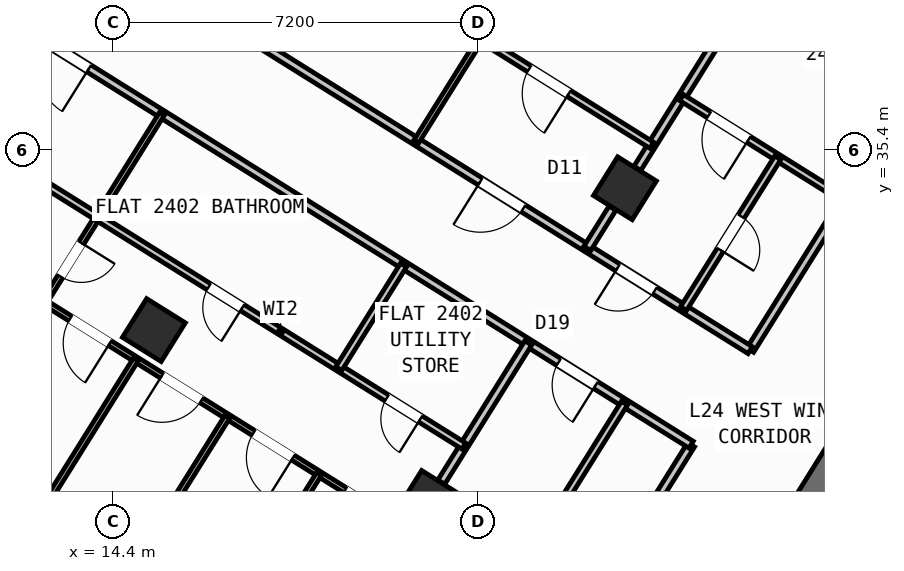
"""IFC4 building model, lengths in metres.
Left out: names, types, materials, properties, quantities, classifications, styles, units other than length and angle.
Written with IfcOpenShell. Run it as: python <this file> out.ifc"""

import sys

from ifc_helpers import new_model, si_unit, direction, frame, frame_2d, origin, origin_2d, place, context, subcontext, project, spatial, rectangle, hollow_rectangle, extrude, source, transform, mapped, element, fill, save


model = new_model("IFC4")
c1 = context("Model", 3, precision=1e-05, world=origin(), true_north=direction((0.0, 1.0)))
c2 = subcontext(c1, "Body", "Model", "MODEL_VIEW")
j1 = project(units=[si_unit("LENGTHUNIT", "METRE"), si_unit("PLANEANGLEUNIT", "RADIAN")], contexts=[c1])
p1 = place(None, origin())
s1 = spatial("IfcSite", under=j1, at=p1, CompositionType="ELEMENT")
p2 = place(p1, origin())
s2 = spatial("IfcBuilding", under=s1, at=p2, CompositionType="ELEMENT")
p3 = place(p2, frame((0.0, 0.0, 97.2)))
s3 = spatial("IfcBuildingStorey", under=s2, at=p3, CompositionType="ELEMENT", Elevation=97.2)
p4 = place(p3, frame((29.491, 30.552, 0.0), z_axis=(0.0, 0.0, 1.0), x_axis=(-0.529893103397, -0.8480644427, 0.0)))
e1 = element("IfcWall", 1, at=p4, inside=s3, PredefinedType="SHEAR", context=c2, shape_type="SweptSolid", body=[
    extrude(rectangle(XDim=3.525, YDim=0.65, at=frame_2d((1.763, 0.0))), origin(), (0.0, 0.0, 1.0), 3.32),
])
m1 = source(origin(), c2, "Body", "SweptSolid", [
    extrude(hollow_rectangle(XDim=0.9, YDim=0.9, WallThickness=0.036, at=origin_2d()), origin(), (0.0, 0.0, 1.0), 3.6),
])
for number, where, z_axis, x_axis in (
    (2, (24.5, 34.643, 0.0), (0.0, 0.0, 1.0), (-0.848, 0.53, 0.0)),
    (3, (20.632, 28.452, 0.0), (0.0, 0.0, 1.0), (-0.848, 0.53, 0.0)),
    (4, (15.205, 31.844, 0.0), (0.0, 0.0, 1.0), (-0.848, 0.53, 0.0)),
):
    element("IfcColumn", number, at=place(p3, frame(where, z_axis=z_axis, x_axis=x_axis)), inside=s3, PredefinedType="COLUMN", context=c2, shape_type="MappedRepresentation", body=[
        mapped(m1, transform((0.0, 0.0, 0.0), scale=1.0)),
    ])
p5 = place(p3, frame((5.7, 28.71, 0.0), z_axis=(0.0, 0.0, 1.0), x_axis=(0.529923711467, 0.8480453172, 0.0)))
e5 = element("IfcWall", 5, at=p5, inside=s3, PredefinedType="STANDARD", context=c2, shape_type="SweptSolid", body=[
    extrude(rectangle(XDim=21.587, YDim=0.32, at=frame_2d((10.794, 0.0))), origin(), (0.0, 0.0, 1.0), 2.745),
])
p6 = place(p5, frame((2.994, 0.0, 0.8)))
e6 = element("IfcOpeningElement", 6, at=p6, cuts=e5, PredefinedType="OPENING", context=c2, shape_type="SweptSolid", body=[
    extrude(rectangle(XDim=2.1, YDim=1.55, at=frame_2d((1.05, 0.775))), frame((0.0, 0.17, 0.0), z_axis=(0.0, -1.0, 0.0), x_axis=(1.0, 0.0, 0.0)), (0.0, 0.0, 1.0), 0.34),
])
p7 = place(p5, frame((9.739, 0.0, 1.0)))
e7 = element("IfcOpeningElement", 7, at=p7, cuts=e5, PredefinedType="OPENING", context=c2, shape_type="SweptSolid", body=[
    extrude(rectangle(XDim=0.9, YDim=1.25, at=frame_2d((0.45, 0.625))), frame((0.0, 0.17, 0.0), z_axis=(0.0, -1.0, 0.0), x_axis=(1.0, 0.0, 0.0)), (0.0, 0.0, 1.0), 0.34),
])
p8 = place(p5, frame((18.639, 0.0, 0.85)))
e8 = element("IfcOpeningElement", 8, at=p8, cuts=e5, PredefinedType="OPENING", context=c2, shape_type="SweptSolid", body=[
    extrude(rectangle(XDim=1.5, YDim=1.5, at=frame_2d((0.75, 0.75))), frame((0.0, 0.17, 0.0), z_axis=(0.0, -1.0, 0.0), x_axis=(1.0, 0.0, 0.0)), (0.0, 0.0, 1.0), 0.34),
])
p9 = place(p3, frame((17.424, 47.083, 0.0), z_axis=(0.0, 0.0, 1.0), x_axis=(0.848049927979, -0.529916332693, 0.0)))
e9 = element("IfcWall", 9, at=p9, inside=s3, PredefinedType="STANDARD", context=c2, shape_type="SweptSolid", body=[
    extrude(rectangle(XDim=29.223, YDim=0.32, at=frame_2d((14.612, 0.0))), origin(), (0.0, 0.0, 1.0), 3.32),
])
p10 = place(p9, frame((3.745, 0.0, 0.0)))
e10 = element("IfcOpeningElement", 10, at=p10, cuts=e9, PredefinedType="OPENING", context=c2, shape_type="SweptSolid", body=[
    extrude(rectangle(XDim=1.05, YDim=2.15, at=frame_2d((0.525, 1.075))), frame((0.0, 0.17, 0.0), z_axis=(0.0, -1.0, 0.0), x_axis=(1.0, 0.0, 0.0)), (0.0, 0.0, 1.0), 0.34),
])
p11 = place(p9, frame((0.699, 0.0, 0.95)))
e11 = element("IfcOpeningElement", 11, at=p11, cuts=e9, PredefinedType="OPENING", context=c2, shape_type="SweptSolid", body=[
    extrude(rectangle(XDim=1.2, YDim=1.4, at=frame_2d((0.6, 0.7))), frame((0.0, 0.17, 0.0), z_axis=(0.0, -1.0, 0.0), x_axis=(1.0, 0.0, 0.0)), (0.0, 0.0, 1.0), 0.34),
])
p12 = place(p9, frame((6.951, 0.0, 1.0)))
e12 = element("IfcOpeningElement", 12, at=p12, cuts=e9, PredefinedType="OPENING", context=c2, shape_type="SweptSolid", body=[
    extrude(rectangle(XDim=0.9, YDim=1.25, at=frame_2d((0.45, 0.625))), frame((0.0, 0.17, 0.0), z_axis=(0.0, -1.0, 0.0), x_axis=(1.0, 0.0, 0.0)), (0.0, 0.0, 1.0), 0.34),
])
p13 = place(p9, frame((9.841, 0.0, 0.85)))
e13 = element("IfcOpeningElement", 13, at=p13, cuts=e9, PredefinedType="OPENING", context=c2, shape_type="SweptSolid", body=[
    extrude(rectangle(XDim=1.5, YDim=1.5, at=frame_2d((0.75, 0.75))), frame((0.0, 0.17, 0.0), z_axis=(0.0, -1.0, 0.0), x_axis=(1.0, 0.0, 0.0)), (0.0, 0.0, 1.0), 0.34),
])
p14 = place(p9, frame((13.889, 0.0, 0.95)))
e14 = element("IfcOpeningElement", 14, at=p14, cuts=e9, PredefinedType="OPENING", context=c2, shape_type="SweptSolid", body=[
    extrude(rectangle(XDim=1.2, YDim=1.4, at=frame_2d((0.6, 0.7))), frame((0.0, 0.17, 0.0), z_axis=(0.0, -1.0, 0.0), x_axis=(1.0, 0.0, 0.0)), (0.0, 0.0, 1.0), 0.34),
])
p15 = place(p9, frame((17.254, 0.0, 1.0)))
e15 = element("IfcOpeningElement", 15, at=p15, cuts=e9, PredefinedType="OPENING", context=c2, shape_type="SweptSolid", body=[
    extrude(rectangle(XDim=0.9, YDim=1.25, at=frame_2d((0.45, 0.625))), frame((0.0, 0.17, 0.0), z_axis=(0.0, -1.0, 0.0), x_axis=(1.0, 0.0, 0.0)), (0.0, 0.0, 1.0), 0.34),
])
p16 = place(p9, frame((20.764, 0.0, 0.8)))
e16 = element("IfcOpeningElement", 16, at=p16, cuts=e9, PredefinedType="OPENING", context=c2, shape_type="SweptSolid", body=[
    extrude(rectangle(XDim=2.1, YDim=1.55, at=frame_2d((1.05, 0.775))), frame((0.0, 0.17, 0.0), z_axis=(0.0, -1.0, 0.0), x_axis=(1.0, 0.0, 0.0)), (0.0, 0.0, 1.0), 0.34),
])
p17 = place(p9, frame((25.403, 0.0, 0.8)))
e17 = element("IfcOpeningElement", 17, at=p17, cuts=e9, PredefinedType="OPENING", context=c2, shape_type="SweptSolid", body=[
    extrude(rectangle(XDim=2.1, YDim=1.55, at=frame_2d((1.05, 0.775))), frame((0.0, 0.17, 0.0), z_axis=(0.0, -1.0, 0.0), x_axis=(1.0, 0.0, 0.0)), (0.0, 0.0, 1.0), 0.34),
])
p18 = place(p3, frame((31.239, 38.274, 0.0), z_axis=(0.0, 0.0, 1.0), x_axis=(-0.529928058306, -0.848042600947, 0.0)))
e18 = element("IfcWall", 18, at=p18, inside=s3, PredefinedType="PARTITIONING", context=c2, shape_type="SweptSolid", body=[
    extrude(rectangle(XDim=8.05, YDim=0.16, at=frame_2d((4.025, 0.0))), origin(), (0.0, 0.0, 1.0), 3.31),
])
p19 = place(p3, frame((25.807, 29.582, 0.0), z_axis=(0.0, 0.0, 1.0), x_axis=(-0.529920357077, -0.848047413271, 0.0)))
e19 = element("IfcWall", 19, at=p19, inside=s3, PredefinedType="PARTITIONING", context=c2, shape_type="SweptSolid", body=[
    extrude(rectangle(XDim=11.45, YDim=0.16, at=frame_2d((5.725, 0.0))), origin(), (0.0, 0.0, 1.0), 3.31),
])
p20 = place(p3, frame((26.973, 31.447, 0.0), z_axis=(0.0, 0.0, 1.0), x_axis=(-0.848048310262, 0.529918921593, 0.0)))
e20 = element("IfcWall", 20, at=p20, inside=s3, PredefinedType="PARTITIONING", context=c2, shape_type="SweptSolid", body=[
    extrude(rectangle(XDim=16.73, YDim=0.16, at=frame_2d((8.365, 0.0))), origin(), (0.0, 0.0, 1.0), 3.31),
])
p21 = place(p20, frame((2.22, 0.0, 0.0)))
e21 = element("IfcOpeningElement", 21, at=p21, cuts=e20, PredefinedType="OPENING", context=c2, shape_type="SweptSolid", body=[
    extrude(rectangle(XDim=0.86, YDim=2.05, at=frame_2d((0.43, 1.025))), frame((0.0, 0.09, 0.0), z_axis=(0.0, -1.0, 0.0), x_axis=(1.0, 0.0, 0.0)), (0.0, 0.0, 1.0), 0.18),
])
p22 = place(p20, frame((5.28, 0.0, 0.0)))
e22 = element("IfcOpeningElement", 22, at=p22, cuts=e20, PredefinedType="OPENING", context=c2, shape_type="SweptSolid", body=[
    extrude(rectangle(XDim=1.0, YDim=2.1, at=frame_2d((0.5, 1.05))), frame((0.0, 0.09, 0.0), z_axis=(0.0, -1.0, 0.0), x_axis=(1.0, 0.0, 0.0)), (0.0, 0.0, 1.0), 0.18),
])
p23 = place(p3, frame((25.807, 29.582, 0.0), z_axis=(0.0, 0.0, 1.0), x_axis=(-0.848052408131, 0.529912363569, 0.0)))
e23 = element("IfcWall", 23, at=p23, inside=s3, PredefinedType="PARTITIONING", context=c2, shape_type="SweptSolid", body=[
    extrude(rectangle(XDim=16.73, YDim=0.16, at=frame_2d((8.365, 0.0))), origin(), (0.0, 0.0, 1.0), 3.31),
])
p24 = place(p23, frame((2.22, 0.0, 0.0)))
e24 = element("IfcOpeningElement", 24, at=p24, cuts=e23, PredefinedType="OPENING", context=c2, shape_type="SweptSolid", body=[
    extrude(rectangle(XDim=0.86, YDim=2.05, at=frame_2d((0.43, 1.025))), frame((0.0, 0.09, 0.0), z_axis=(0.0, -1.0, 0.0), x_axis=(1.0, 0.0, 0.0)), (0.0, 0.0, 1.0), 0.18),
])
p25 = place(p23, frame((14.013, 0.0, 0.0)))
e25 = element("IfcOpeningElement", 25, at=p25, cuts=e23, PredefinedType="OPENING", context=c2, shape_type="SweptSolid", body=[
    extrude(rectangle(XDim=1.0, YDim=2.1, at=frame_2d((0.5, 1.05))), frame((0.0, 0.09, 0.0), z_axis=(0.0, -1.0, 0.0), x_axis=(1.0, 0.0, 0.0)), (0.0, 0.0, 1.0), 0.18),
])
p26 = place(p3, frame((22.593, 31.59, 0.0), z_axis=(0.0, 0.0, 1.0), x_axis=(-0.529924383291, -0.848044897393, 0.0)))
e26 = element("IfcWall", 26, at=p26, inside=s3, PredefinedType="PARTITIONING", context=c2, shape_type="SweptSolid", body=[
    extrude(rectangle(XDim=3.238, YDim=0.16, at=frame_2d((1.619, 0.0))), origin(), (0.0, 0.0, 1.0), 2.745),
])
p27 = place(p3, frame((24.492, 30.403, 0.0), z_axis=(0.0, 0.0, 1.0), x_axis=(-0.529919283494, -0.848048084121, 0.0)))
e27 = element("IfcWall", 27, at=p27, inside=s3, PredefinedType="PLUMBINGWALL", context=c2, shape_type="SweptSolid", body=[
    extrude(rectangle(XDim=5.51, YDim=0.14, at=frame_2d((2.755, 0.0))), origin(), (0.0, 0.0, 1.0), 2.935),
])
p28 = place(p27, frame((2.365, 0.0, 0.0)))
e28 = element("IfcOpeningElement", 28, at=p28, cuts=e27, PredefinedType="OPENING", context=c2, shape_type="SweptSolid", body=[
    extrude(rectangle(XDim=0.78, YDim=2.05, at=frame_2d((0.39, 1.025))), frame((0.0, 0.08, 0.0), z_axis=(0.0, -1.0, 0.0), x_axis=(1.0, 0.0, 0.0)), (0.0, 0.0, 1.0), 0.16),
])
p29 = place(p3, frame((15.361, 36.108, 0.0), z_axis=(0.0, 0.0, 1.0), x_axis=(-0.529912802348, -0.848052133956, 0.0)))
e29 = element("IfcWall", 29, at=p29, inside=s3, PredefinedType="PARTITIONING", context=c2, shape_type="SweptSolid", body=[
    extrude(rectangle(XDim=11.72, YDim=0.11, at=frame_2d((5.86, 0.0))), origin(), (0.0, 0.0, 1.0), 2.935),
])
p30 = place(p29, frame((3.0, 0.0, 0.0)))
e30 = element("IfcOpeningElement", 30, at=p30, cuts=e29, PredefinedType="OPENING", context=c2, shape_type="SweptSolid", body=[
    extrude(rectangle(XDim=0.78, YDim=2.05, at=frame_2d((0.39, 1.025))), frame((0.0, 0.065, 0.0), z_axis=(0.0, -1.0, 0.0), x_axis=(1.0, 0.0, 0.0)), (0.0, 0.0, 1.0), 0.13),
])
p31 = place(p3, frame((14.09, 34.073, 0.0), z_axis=(0.0, 0.0, 1.0), x_axis=(-0.848045135007, 0.529924003034, 0.0)))
e31 = element("IfcWall", 31, at=p31, inside=s3, PredefinedType="PLUMBINGWALL", context=c2, shape_type="SweptSolid", body=[
    extrude(rectangle(XDim=4.393, YDim=0.14, at=frame_2d((2.196, 0.0))), origin(), (0.0, 0.0, 1.0), 3.31),
])
p32 = place(p31, frame((1.737, 0.0, 0.0)))
e32 = element("IfcOpeningElement", 32, at=p32, cuts=e31, PredefinedType="OPENING", context=c2, shape_type="SweptSolid", body=[
    extrude(rectangle(XDim=0.92, YDim=2.08, at=frame_2d((0.46, 1.04))), frame((0.0, 0.08, 0.0), z_axis=(0.0, -1.0, 0.0), x_axis=(1.0, 0.0, 0.0)), (0.0, 0.0, 1.0), 0.16),
])
p33 = place(p3, frame((21.321, 29.554, 0.0), z_axis=(0.0, 0.0, 1.0), x_axis=(-0.84803529765, 0.529939745575, 0.0)))
e33 = element("IfcWall", 33, at=p33, inside=s3, PredefinedType="PLUMBINGWALL", context=c2, shape_type="SweptSolid", body=[
    extrude(rectangle(XDim=8.527, YDim=0.14, at=frame_2d((4.264, 0.0))), origin(), (0.0, 0.0, 1.0), 3.31),
])
p34 = place(p33, frame((5.155, 0.0, 0.0)))
e34 = element("IfcOpeningElement", 34, at=p34, cuts=e33, PredefinedType="OPENING", context=c2, shape_type="SweptSolid", body=[
    extrude(rectangle(XDim=0.78, YDim=2.05, at=frame_2d((0.39, 1.025))), frame((0.0, 0.08, 0.0), z_axis=(0.0, -1.0, 0.0), x_axis=(1.0, 0.0, 0.0)), (0.0, 0.0, 1.0), 0.16),
])
p35 = place(p33, frame((1.011, 0.0, 0.0)))
e35 = element("IfcOpeningElement", 35, at=p35, cuts=e33, PredefinedType="OPENING", context=c2, shape_type="SweptSolid", body=[
    extrude(rectangle(XDim=0.78, YDim=2.05, at=frame_2d((0.39, 1.025))), frame((0.0, 0.08, 0.0), z_axis=(0.0, -1.0, 0.0), x_axis=(1.0, 0.0, 0.0)), (0.0, 0.0, 1.0), 0.16),
])
p36 = place(p3, frame((20.132, 33.128, 0.0), z_axis=(0.0, 0.0, 1.0), x_axis=(-0.529935194983, -0.848038141311, 0.0)))
e36 = element("IfcWall", 36, at=p36, inside=s3, PredefinedType="PLUMBINGWALL", context=c2, shape_type="SweptSolid", body=[
    extrude(rectangle(XDim=2.41, YDim=0.14, at=frame_2d((1.205, 0.0))), origin(), (0.0, 0.0, 1.0), 3.31),
])
p37 = place(p3, frame((20.272, 27.875, 0.0), z_axis=(0.0, 0.0, 1.0), x_axis=(-0.848056204746, 0.529906287557, 0.0)))
e37 = element("IfcWall", 37, at=p37, inside=s3, PredefinedType="PARTITIONING", context=c2, shape_type="SweptSolid", body=[
    extrude(rectangle(XDim=8.527, YDim=0.11, at=frame_2d((4.264, 0.0))), origin(), (0.0, 0.0, 1.0), 3.31),
])
p38 = place(p37, frame((0.606, 0.0, 0.0)))
e38 = element("IfcOpeningElement", 38, at=p38, cuts=e37, PredefinedType="OPENING", context=c2, shape_type="SweptSolid", body=[
    extrude(rectangle(XDim=0.92, YDim=2.08, at=frame_2d((0.46, 1.04))), frame((0.0, 0.065, 0.0), z_axis=(0.0, -1.0, 0.0), x_axis=(1.0, 0.0, 0.0)), (0.0, 0.0, 1.0), 0.13),
])
p39 = place(p37, frame((2.738, 0.0, 0.0)))
e39 = element("IfcOpeningElement", 39, at=p39, cuts=e37, PredefinedType="OPENING", context=c2, shape_type="SweptSolid", body=[
    extrude(rectangle(XDim=0.92, YDim=2.08, at=frame_2d((0.46, 1.04))), frame((0.0, 0.065, 0.0), z_axis=(0.0, -1.0, 0.0), x_axis=(1.0, 0.0, 0.0)), (0.0, 0.0, 1.0), 0.13),
])
p40 = place(p37, frame((4.869, 0.0, 0.0)))
e40 = element("IfcOpeningElement", 40, at=p40, cuts=e37, PredefinedType="OPENING", context=c2, shape_type="SweptSolid", body=[
    extrude(rectangle(XDim=0.92, YDim=2.08, at=frame_2d((0.46, 1.04))), frame((0.0, 0.065, 0.0), z_axis=(0.0, -1.0, 0.0), x_axis=(1.0, 0.0, 0.0)), (0.0, 0.0, 1.0), 0.13),
])
p41 = place(p37, frame((7.001, 0.0, 0.0)))
e41 = element("IfcOpeningElement", 41, at=p41, cuts=e37, PredefinedType="OPENING", context=c2, shape_type="SweptSolid", body=[
    extrude(rectangle(XDim=0.92, YDim=2.08, at=frame_2d((0.46, 1.04))), frame((0.0, 0.065, 0.0), z_axis=(0.0, -1.0, 0.0), x_axis=(1.0, 0.0, 0.0)), (0.0, 0.0, 1.0), 0.13),
])
for number, where, z_axis, x_axis in (
    (42, (18.464, 29.005, 0.0), (0.0, 0.0, 1.0), (-0.53, -0.848, 0.0)),
    (43, (16.656, 30.135, 0.0), (0.0, 0.0, 1.0), (-0.53, -0.848, 0.0)),
):
    element("IfcWall", number, at=place(p3, frame(where, z_axis=z_axis, x_axis=x_axis)), inside=s3, PredefinedType="PARTITIONING", context=c2, shape_type="SweptSolid", body=[
        extrude(rectangle(XDim=7.34, YDim=0.11, at=frame_2d((3.67, 0.0))), origin(), (0.0, 0.0, 1.0), 2.935),
    ])
p42 = place(p3, frame((14.848, 31.264, 0.0), z_axis=(0.0, 0.0, 1.0), x_axis=(-0.529920534869, -0.848047302174, 0.0)))
e44 = element("IfcWall", 44, at=p42, inside=s3, PredefinedType="PARTITIONING", context=c2, shape_type="SweptSolid", body=[
    extrude(rectangle(XDim=6.158, YDim=0.11, at=frame_2d((3.079, 0.0))), origin(), (0.0, 0.0, 1.0), 2.745),
])
p43 = place(p3, frame((27.607, 39.615, 0.0), z_axis=(0.0, 0.0, 1.0), x_axis=(-0.529913610495, -0.848051628978, 0.0)))
e45 = element("IfcWall", 45, at=p43, inside=s3, PredefinedType="PARTITIONING", context=c2, shape_type="SweptSolid", body=[
    extrude(rectangle(XDim=5.401, YDim=0.16, at=frame_2d((2.7, 0.0))), origin(), (0.0, 0.0, 1.0), 2.745),
])
p44 = place(p3, frame((24.256, 34.251, 0.0), z_axis=(0.0, 0.0, 1.0), x_axis=(-0.529952145338, -0.848027548876, 0.0)))
e46 = element("IfcWall", 46, at=p44, inside=s3, PredefinedType="PARTITIONING", context=c2, shape_type="SweptSolid", body=[
    extrude(rectangle(XDim=0.938, YDim=0.16, at=frame_2d((0.469, 0.0))), origin(), (0.0, 0.0, 1.0), 2.745),
])
p45 = place(p3, frame((28.833, 34.424, 0.0), z_axis=(0.0, 0.0, 1.0), x_axis=(-0.848059820872, 0.529900500304, 0.0)))
e47 = element("IfcWall", 47, at=p45, inside=s3, PredefinedType="PLUMBINGWALL", context=c2, shape_type="SweptSolid", body=[
    extrude(rectangle(XDim=3.79, YDim=0.14, at=frame_2d((1.895, 0.0))), origin(), (0.0, 0.0, 1.0), 3.31),
])
p46 = place(p45, frame((2.23, 0.0, 0.0)))
e48 = element("IfcOpeningElement", 48, at=p46, cuts=e47, PredefinedType="OPENING", context=c2, shape_type="SweptSolid", body=[
    extrude(rectangle(XDim=0.92, YDim=2.08, at=frame_2d((0.46, 1.04))), frame((0.0, 0.08, 0.0), z_axis=(0.0, -1.0, 0.0), x_axis=(1.0, 0.0, 0.0)), (0.0, 0.0, 1.0), 0.16),
])
p47 = place(p3, frame((27.518, 35.245, 0.0), z_axis=(0.0, 0.0, 1.0), x_axis=(-0.529948921118, -0.848029563757, 0.0)))
e49 = element("IfcWall", 49, at=p47, inside=s3, PredefinedType="PLUMBINGWALL", context=c2, shape_type="SweptSolid", body=[
    extrude(rectangle(XDim=3.51, YDim=0.14, at=frame_2d((1.755, 0.0))), origin(), (0.0, 0.0, 1.0), 2.935),
])
p48 = place(p47, frame((1.365, 0.0, 0.0)))
e50 = element("IfcOpeningElement", 50, at=p48, cuts=e49, PredefinedType="OPENING", context=c2, shape_type="SweptSolid", body=[
    extrude(rectangle(XDim=0.78, YDim=2.05, at=frame_2d((0.39, 1.025))), frame((0.0, 0.08, 0.0), z_axis=(0.0, -1.0, 0.0), x_axis=(1.0, 0.0, 0.0)), (0.0, 0.0, 1.0), 0.16),
])
p49 = place(p3, frame((24.792, 42.62, 0.0), z_axis=(0.0, 0.0, 1.0), x_axis=(-0.529925083182, -0.848044460046, 0.0)))
e51 = element("IfcWall", 51, at=p49, inside=s3, PredefinedType="PARTITIONING", context=c2, shape_type="SweptSolid", body=[
    extrude(rectangle(XDim=8.32, YDim=0.11, at=frame_2d((4.16, 0.0))), origin(), (0.0, 0.0, 1.0), 3.31),
])
p50 = place(p49, frame((4.65, 0.0, 0.0)))
e52 = element("IfcOpeningElement", 52, at=p50, cuts=e51, PredefinedType="OPENING", context=c2, shape_type="SweptSolid", body=[
    extrude(rectangle(XDim=0.78, YDim=2.05, at=frame_2d((0.39, 1.025))), frame((0.0, 0.065, 0.0), z_axis=(0.0, -1.0, 0.0), x_axis=(1.0, 0.0, 0.0)), (0.0, 0.0, 1.0), 0.13),
])
p51 = place(p3, frame((25.03, 35.491, 0.0), z_axis=(0.0, 0.0, 1.0), x_axis=(-0.848070667369, 0.52988314103, 0.0)))
e53 = element("IfcWall", 53, at=p51, inside=s3, PredefinedType="PLUMBINGWALL", context=c2, shape_type="SweptSolid", body=[
    extrude(rectangle(XDim=3.98, YDim=0.14, at=frame_2d((1.99, 0.0))), origin(), (0.0, 0.0, 1.0), 3.31),
])
p52 = place(p51, frame((1.93, 0.0, 0.0)))
e54 = element("IfcOpeningElement", 54, at=p52, cuts=e53, PredefinedType="OPENING", context=c2, shape_type="SweptSolid", body=[
    extrude(rectangle(XDim=0.92, YDim=2.08, at=frame_2d((0.46, 1.04))), frame((0.0, 0.08, 0.0), z_axis=(0.0, -1.0, 0.0), x_axis=(1.0, 0.0, 0.0)), (0.0, 0.0, 1.0), 0.16),
])
m2 = source(origin(), c2, "Body", "SweptSolid", [
    extrude(rectangle(XDim=0.86, YDim=2.05, at=frame_2d((0.43, 1.025))), frame((0.0, 0.025, 0.0), z_axis=(0.0, -1.0, 0.0), x_axis=(1.0, 0.0, 0.0)), (0.0, 0.0, 1.0), 0.05),
])
p53 = place(p24, origin())
e55 = element("IfcDoor", 55, at=p53, inside=s3, OperationType="SINGLE_SWING_LEFT", PredefinedType="DOOR", context=c2, shape_type="MappedRepresentation", body=[
    mapped(m2, transform((0.0, 0.0, 0.0), scale=1.0)),
])
fill(e24, e55)
m3 = source(origin(), c2, "Body", "SweptSolid", [
    extrude(rectangle(XDim=1.0, YDim=2.1, at=frame_2d((0.5, 1.05))), frame((0.0, 0.025, 0.0), z_axis=(0.0, -1.0, 0.0), x_axis=(1.0, 0.0, 0.0)), (0.0, 0.0, 1.0), 0.05),
])
p54 = place(p25, origin())
e56 = element("IfcDoor", 56, at=p54, inside=s3, OperationType="SINGLE_SWING_LEFT", PredefinedType="DOOR", context=c2, shape_type="MappedRepresentation", body=[
    mapped(m3, transform((0.0, 0.0, 0.0), scale=1.0)),
])
fill(e25, e56)
m4 = source(origin(), c2, "Body", "SweptSolid", [
    extrude(rectangle(XDim=0.78, YDim=2.05, at=frame_2d((0.39, 1.025))), frame((0.0, 0.025, 0.0), z_axis=(0.0, -1.0, 0.0), x_axis=(1.0, 0.0, 0.0)), (0.0, 0.0, 1.0), 0.05),
])
p55 = place(p30, origin())
e57 = element("IfcDoor", 57, at=p55, inside=s3, OperationType="SINGLE_SWING_LEFT", PredefinedType="DOOR", context=c2, shape_type="MappedRepresentation", body=[
    mapped(m4, transform((0.0, 0.0, 0.0), scale=1.0)),
])
fill(e30, e57)
p56 = place(p34, origin())
e58 = element("IfcDoor", 58, at=p56, inside=s3, OperationType="SINGLE_SWING_LEFT", PredefinedType="DOOR", context=c2, shape_type="MappedRepresentation", body=[
    mapped(m4, transform((0.0, 0.0, 0.0), scale=1.0)),
])
fill(e34, e58)
p57 = place(p35, origin())
e59 = element("IfcDoor", 59, at=p57, inside=s3, OperationType="SINGLE_SWING_LEFT", PredefinedType="DOOR", context=c2, shape_type="MappedRepresentation", body=[
    mapped(m4, transform((0.0, 0.0, 0.0), scale=1.0)),
])
fill(e35, e59)
m5 = source(origin(), c2, "Body", "SweptSolid", [
    extrude(rectangle(XDim=0.92, YDim=2.08, at=frame_2d((0.46, 1.04))), frame((0.0, 0.025, 0.0), z_axis=(0.0, -1.0, 0.0), x_axis=(1.0, 0.0, 0.0)), (0.0, 0.0, 1.0), 0.05),
])
p58 = place(p38, origin())
e60 = element("IfcDoor", 60, at=p58, inside=s3, OperationType="SINGLE_SWING_RIGHT", PredefinedType="DOOR", context=c2, shape_type="MappedRepresentation", body=[
    mapped(m5, transform((0.0, 0.0, 0.0), scale=1.0)),
])
fill(e38, e60)
p59 = place(p39, origin())
e61 = element("IfcDoor", 61, at=p59, inside=s3, OperationType="SINGLE_SWING_LEFT", PredefinedType="DOOR", context=c2, shape_type="MappedRepresentation", body=[
    mapped(m5, transform((0.0, 0.0, 0.0), scale=1.0)),
])
fill(e39, e61)
p60 = place(p40, origin())
e62 = element("IfcDoor", 62, at=p60, inside=s3, OperationType="SINGLE_SWING_RIGHT", PredefinedType="DOOR", context=c2, shape_type="MappedRepresentation", body=[
    mapped(m5, transform((0.0, 0.0, 0.0), scale=1.0)),
])
fill(e40, e62)
p61 = place(p41, origin())
e63 = element("IfcDoor", 63, at=p61, inside=s3, OperationType="SINGLE_SWING_LEFT", PredefinedType="DOOR", context=c2, shape_type="MappedRepresentation", body=[
    mapped(m5, transform((0.0, 0.0, 0.0), scale=1.0)),
])
fill(e41, e63)
p62 = place(p21, origin())
e64 = element("IfcDoor", 64, at=p62, inside=s3, OperationType="SINGLE_SWING_RIGHT", PredefinedType="DOOR", context=c2, shape_type="MappedRepresentation", body=[
    mapped(m2, transform((0.0, 0.0, 0.0), scale=1.0)),
])
fill(e21, e64)
p63 = place(p46, origin())
e65 = element("IfcDoor", 65, at=p63, inside=s3, OperationType="SINGLE_SWING_LEFT", PredefinedType="DOOR", context=c2, shape_type="MappedRepresentation", body=[
    mapped(m5, transform((0.0, 0.0, 0.0), scale=1.0)),
])
fill(e48, e65)
p64 = place(p48, origin())
e66 = element("IfcDoor", 66, at=p64, inside=s3, OperationType="SINGLE_SWING_RIGHT", PredefinedType="DOOR", context=c2, shape_type="MappedRepresentation", body=[
    mapped(m4, transform((0.0, 0.0, 0.0), scale=1.0)),
])
fill(e50, e66)
p65 = place(p22, origin())
e67 = element("IfcDoor", 67, at=p65, inside=s3, OperationType="SINGLE_SWING_RIGHT", PredefinedType="DOOR", context=c2, shape_type="MappedRepresentation", body=[
    mapped(m3, transform((0.0, 0.0, 0.0), scale=1.0)),
])
fill(e22, e67)
p66 = place(p52, origin())
e68 = element("IfcDoor", 68, at=p66, inside=s3, OperationType="SINGLE_SWING_LEFT", PredefinedType="DOOR", context=c2, shape_type="MappedRepresentation", body=[
    mapped(m5, transform((0.0, 0.0, 0.0), scale=1.0)),
])
fill(e54, e68)
save(model, sys.argv[1])
